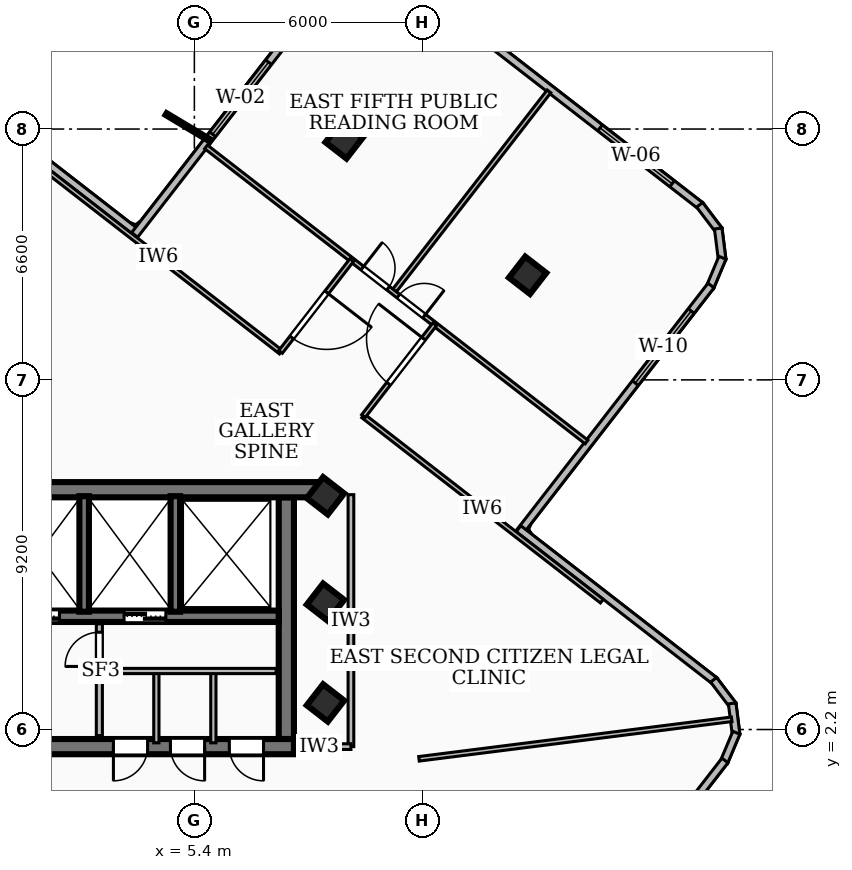
"""IFC4 building model, lengths in metres.
Left out: names, types, materials, properties, quantities, classifications, styles, units other than length and angle.
Written with IfcOpenShell. Run it as: python <this file> out.ifc"""

import sys

from ifc_helpers import new_model, si_unit, direction, frame, frame_2d, origin, origin_2d, place, context, subcontext, project, spatial, rectangle, extrude, element, fill, save


model = new_model("IFC4")
c1 = context("Model", 3, precision=1e-05, world=origin(), true_north=direction((0.0, 1.0)))
c2 = subcontext(c1, "Body", "Model", "MODEL_VIEW")
j1 = project(units=[si_unit("LENGTHUNIT", "METRE"), si_unit("PLANEANGLEUNIT", "RADIAN")], contexts=[c1])
p1 = place(None, origin())
s1 = spatial("IfcSite", under=j1, at=p1, CompositionType="ELEMENT")
p2 = place(p1, origin())
s2 = spatial("IfcBuilding", under=s1, at=p2, CompositionType="ELEMENT")
p3 = place(p2, frame((0.0, 0.0, 257.76)))
s3 = spatial("IfcBuildingStorey", under=s2, at=p3, CompositionType="ELEMENT", Elevation=257.76)
p4 = place(p3, frame((-8.78, 8.51, 0.0), z_axis=(0.0, 0.0, 1.0), x_axis=(1.0, 0.0, 0.0)))
e1 = element("IfcWall", 1, at=p4, inside=s3, PredefinedType="SHEAR", context=c2, shape_type="SweptSolid", body=[
    extrude(rectangle(XDim=17.56, YDim=0.4, at=frame_2d((8.78, 0.0))), origin(), (0.0, 0.0, 1.0), 3.16),
])
p5 = place(p3, frame((8.02, 1.75, 0.0), z_axis=(0.0, 0.0, 1.0), x_axis=(-1.0, 0.0, 0.0)))
e2 = element("IfcWall", 2, at=p5, inside=s3, PredefinedType="SHEAR", context=c2, shape_type="SweptSolid", body=[
    extrude(rectangle(XDim=16.04, YDim=0.4, at=frame_2d((8.02, 0.0))), origin(), (0.0, 0.0, 1.0), 3.16),
])
p6 = place(p5, frame((7.45, 0.0, 0.0)))
e3 = element("IfcOpeningElement", 3, at=p6, cuts=e2, PredefinedType="OPENING", context=c2, shape_type="SweptSolid", body=[
    extrude(rectangle(XDim=1.0, YDim=2.1, at=frame_2d((0.5, 1.05))), frame((0.0, 0.21, 0.0), z_axis=(0.0, -1.0, 0.0), x_axis=(1.0, 0.0, 0.0)), (0.0, 0.0, 1.0), 0.42),
])
p7 = place(p5, frame((14.285, 0.0, 0.0)))
e4 = element("IfcOpeningElement", 4, at=p7, cuts=e2, PredefinedType="OPENING", context=c2, shape_type="SweptSolid", body=[
    extrude(rectangle(XDim=1.05, YDim=2.15, at=frame_2d((0.525, 1.075))), frame((0.0, 0.21, 0.0), z_axis=(0.0, -1.0, 0.0), x_axis=(1.0, 0.0, 0.0)), (0.0, 0.0, 1.0), 0.42),
])
p8 = place(p5, frame((12.725, 0.0, 0.0)))
e5 = element("IfcOpeningElement", 5, at=p8, cuts=e2, PredefinedType="OPENING", context=c2, shape_type="SweptSolid", body=[
    extrude(rectangle(XDim=1.05, YDim=2.15, at=frame_2d((0.525, 1.075))), frame((0.0, 0.21, 0.0), z_axis=(0.0, -1.0, 0.0), x_axis=(1.0, 0.0, 0.0)), (0.0, 0.0, 1.0), 0.42),
])
p9 = place(p5, frame((11.165, 0.0, 0.0)))
e6 = element("IfcOpeningElement", 6, at=p9, cuts=e2, PredefinedType="OPENING", context=c2, shape_type="SweptSolid", body=[
    extrude(rectangle(XDim=1.05, YDim=2.15, at=frame_2d((0.525, 1.075))), frame((0.0, 0.21, 0.0), z_axis=(0.0, -1.0, 0.0), x_axis=(1.0, 0.0, 0.0)), (0.0, 0.0, 1.0), 0.42),
])
p10 = place(p5, frame((3.85, 0.0, 0.0)))
e7 = element("IfcOpeningElement", 7, at=p10, cuts=e2, PredefinedType="OPENING", context=c2, shape_type="SweptSolid", body=[
    extrude(rectangle(XDim=0.9, YDim=2.06, at=frame_2d((0.45, 1.03))), frame((0.0, 0.21, 0.0), z_axis=(0.0, -1.0, 0.0), x_axis=(1.0, 0.0, 0.0)), (0.0, 0.0, 1.0), 0.42),
])
p11 = place(p5, frame((2.35, 0.0, 0.0)))
e8 = element("IfcOpeningElement", 8, at=p11, cuts=e2, PredefinedType="OPENING", context=c2, shape_type="SweptSolid", body=[
    extrude(rectangle(XDim=0.9, YDim=2.06, at=frame_2d((0.45, 1.03))), frame((0.0, 0.21, 0.0), z_axis=(0.0, -1.0, 0.0), x_axis=(1.0, 0.0, 0.0)), (0.0, 0.0, 1.0), 0.42),
])
p12 = place(p5, frame((0.8, 0.0, 0.0)))
e9 = element("IfcOpeningElement", 9, at=p12, cuts=e2, PredefinedType="OPENING", context=c2, shape_type="SweptSolid", body=[
    extrude(rectangle(XDim=0.9, YDim=2.06, at=frame_2d((0.45, 1.03))), frame((0.0, 0.21, 0.0), z_axis=(0.0, -1.0, 0.0), x_axis=(1.0, 0.0, 0.0)), (0.0, 0.0, 1.0), 0.42),
])
p13 = place(p3, frame((7.82, 8.31, 0.0), z_axis=(0.0, 0.0, 1.0), x_axis=(0.0, -1.0, 0.0)))
e10 = element("IfcWall", 10, at=p13, inside=s3, PredefinedType="SHEAR", context=c2, shape_type="SweptSolid", body=[
    extrude(rectangle(XDim=6.36, YDim=0.4, at=frame_2d((3.18, 0.0))), origin(), (0.0, 0.0, 1.0), 3.16),
])
p14 = place(p3, frame((7.62, 5.18, 0.0), z_axis=(0.0, 0.0, 1.0), x_axis=(-1.0, 0.0, 0.0)))
e11 = element("IfcWall", 11, at=p14, inside=s3, PredefinedType="SOLIDWALL", context=c2, shape_type="SweptSolid", body=[
    extrude(rectangle(XDim=15.24, YDim=0.3, at=frame_2d((7.62, 0.0))), origin(), (0.0, 0.0, 1.0), 3.16),
])
p15 = place(p14, frame((5.77, 0.0, 0.0)))
e12 = element("IfcOpeningElement", 12, at=p15, cuts=e11, PredefinedType="OPENING", context=c2, shape_type="SweptSolid", body=[
    extrude(rectangle(XDim=1.1, YDim=2.15, at=frame_2d((0.55, 1.075))), frame((0.0, 0.16, 0.0), z_axis=(0.0, -1.0, 0.0), x_axis=(1.0, 0.0, 0.0)), (0.0, 0.0, 1.0), 0.32),
])
p16 = place(p14, frame((2.97, 0.0, 0.0)))
e13 = element("IfcOpeningElement", 13, at=p16, cuts=e11, PredefinedType="OPENING", context=c2, shape_type="SweptSolid", body=[
    extrude(rectangle(XDim=1.1, YDim=2.15, at=frame_2d((0.55, 1.075))), frame((0.0, 0.16, 0.0), z_axis=(0.0, -1.0, 0.0), x_axis=(1.0, 0.0, 0.0)), (0.0, 0.0, 1.0), 0.32),
])
p17 = place(p14, frame((7.97, 0.0, 0.0)))
e14 = element("IfcOpeningElement", 14, at=p17, cuts=e11, PredefinedType="OPENING", context=c2, shape_type="SweptSolid", body=[
    extrude(rectangle(XDim=1.0, YDim=2.1, at=frame_2d((0.5, 1.05))), frame((0.0, 0.16, 0.0), z_axis=(0.0, -1.0, 0.0), x_axis=(1.0, 0.0, 0.0)), (0.0, 0.0, 1.0), 0.32),
])
for number, where, z_axis, x_axis in (
    (15, (2.5, 5.3, 0.0), (0.0, 0.0, 1.0), (0.0, 1.0, 0.0)),
    (16, (4.9, 5.3, 0.0), (0.0, 0.0, 1.0), (0.0, 1.0, 0.0)),
):
    element("IfcWall", number, at=place(p3, frame(where, z_axis=z_axis, x_axis=x_axis)), inside=s3, PredefinedType="SOLIDWALL", context=c2, shape_type="SweptSolid", body=[
        extrude(rectangle(XDim=3.04, YDim=0.25, at=frame_2d((1.52, 0.0))), origin(), (0.0, 0.0, 1.0), 3.16),
    ])
for number, where, z_axis, x_axis in (
    (17, (8.85, 2.9, 0.0), (0.0, 0.0, 1.0), (0.613, 0.79, 0.0)),
    (18, (8.85, 5.55, 0.0), (0.0, 0.0, 1.0), (0.613, 0.79, 0.0)),
    (19, (8.85, 8.35, 0.0), (0.0, 0.0, 1.0), (0.613, 0.79, 0.0)),
    (20, (14.169, 14.152, 0.0), (0.0, 0.0, 1.0), (0.613, 0.79, 0.0)),
    (21, (9.341, 17.714, 0.0), (0.0, 0.0, 1.0), (0.613, 0.79, 0.0)),
):
    element("IfcColumn", number, at=place(p3, frame(where, z_axis=z_axis, x_axis=x_axis)), inside=s3, PredefinedType="COLUMN", context=c2, shape_type="SweptSolid", body=[
        extrude(rectangle(XDim=0.7, YDim=0.7, at=origin_2d()), origin(), (0.0, 0.0, 1.0), 3.42),
    ])
p18 = place(p3, frame((-1.386, 19.362, 0.0), z_axis=(0.0, 0.0, 1.0), x_axis=(0.790076990755, -0.613007625303, 0.0)))
e22 = element("IfcWall", 22, at=p18, inside=s3, PredefinedType="SOLIDWALL", context=c2, shape_type="SweptSolid", body=[
    extrude(rectangle(XDim=6.742, YDim=0.2, at=frame_2d((3.371, 0.0))), origin(), (0.0, 0.0, 1.0), 3.16),
])
p19 = place(p3, frame((3.829, 15.215, 0.0), z_axis=(0.0, 0.0, 1.0), x_axis=(0.612910709336, 0.790152176724, 0.0)))
e23 = element("IfcWall", 23, at=p19, inside=s3, PredefinedType="SOLIDWALL", context=c2, shape_type="SweptSolid", body=[
    extrude(rectangle(XDim=8.243, YDim=0.2, at=frame_2d((4.121, 0.0))), origin(), (0.0, 0.0, 1.0), 3.16),
])
p20 = place(p19, frame((3.35, 0.0, 0.85)))
e24 = element("IfcOpeningElement", 24, at=p20, cuts=e23, PredefinedType="OPENING", context=c2, shape_type="SweptSolid", body=[
    extrude(rectangle(XDim=2.4, YDim=2.1, at=frame_2d((1.2, 1.05))), frame((0.0, 0.11, 0.0), z_axis=(0.0, -1.0, 0.0), x_axis=(1.0, 0.0, 0.0)), (0.0, 0.0, 1.0), 0.22),
])
p21 = place(p3, frame((10.969, 21.992, 0.0), z_axis=(0.0, 0.0, 1.0), x_axis=(0.790145127041, -0.612919797537, 0.0)))
e25 = element("IfcWall", 25, at=p21, inside=s3, PredefinedType="SOLIDWALL", context=c2, shape_type="SweptSolid", body=[
    extrude(rectangle(XDim=9.823, YDim=0.2, at=frame_2d((4.912, 0.0))), origin(), (0.0, 0.0, 1.0), 3.16),
])
p22 = place(p21, frame((6.462, 0.0, 0.85)))
e26 = element("IfcOpeningElement", 26, at=p22, cuts=e25, PredefinedType="OPENING", context=c2, shape_type="SweptSolid", body=[
    extrude(rectangle(XDim=2.4, YDim=1.85, at=frame_2d((1.2, 0.925))), frame((0.0, 0.11, 0.0), z_axis=(0.0, -1.0, 0.0), x_axis=(1.0, 0.0, 0.0)), (0.0, 0.0, 1.0), 0.22),
])
p23 = place(p3, frame((18.696, 16.006, 0.0), z_axis=(0.0, 0.0, 1.0), x_axis=(0.604322767077, -0.796739601873, 0.0)))
e27 = element("IfcWall", 27, at=p23, inside=s3, PredefinedType="SOLIDWALL", context=c2, shape_type="SweptSolid", body=[
    extrude(rectangle(XDim=0.839, YDim=0.2, at=frame_2d((0.419, 0.0))), origin(), (0.0, 0.0, 1.0), 3.16),
])
p24 = place(p3, frame((19.185, 15.383, 0.0), z_axis=(0.0, 0.0, 1.0), x_axis=(0.124945697241, -0.992163581644, 0.0)))
e28 = element("IfcWall", 28, at=p24, inside=s3, PredefinedType="SOLIDWALL", context=c2, shape_type="SweptSolid", body=[
    extrude(rectangle(XDim=0.824, YDim=0.2, at=frame_2d((0.412, 0.0))), origin(), (0.0, 0.0, 1.0), 3.16),
])
p25 = place(p3, frame((19.295, 14.613, 0.0), z_axis=(0.0, 0.0, 1.0), x_axis=(-0.387549275101, -0.92184898946, 0.0)))
e29 = element("IfcWall", 29, at=p25, inside=s3, PredefinedType="SOLIDWALL", context=c2, shape_type="SweptSolid", body=[
    extrude(rectangle(XDim=0.838, YDim=0.2, at=frame_2d((0.419, 0.0))), origin(), (0.0, 0.0, 1.0), 3.16),
])
p26 = place(p3, frame((18.995, 13.883, 0.0), z_axis=(0.0, 0.0, 1.0), x_axis=(-0.612894114019, -0.790165049215, 0.0)))
e30 = element("IfcWall", 30, at=p26, inside=s3, PredefinedType="SOLIDWALL", context=c2, shape_type="SweptSolid", body=[
    extrude(rectangle(XDim=8.241, YDim=0.2, at=frame_2d((4.121, 0.0))), origin(), (0.0, 0.0, 1.0), 3.16),
])
p27 = place(p26, frame((0.85, 0.0, 0.85)))
e31 = element("IfcOpeningElement", 31, at=p27, cuts=e30, PredefinedType="OPENING", context=c2, shape_type="SweptSolid", body=[
    extrude(rectangle(XDim=2.4, YDim=1.65, at=frame_2d((1.2, 0.825))), frame((0.0, 0.11, 0.0), z_axis=(0.0, -1.0, 0.0), x_axis=(1.0, 0.0, 0.0)), (0.0, 0.0, 1.0), 0.22),
])
p28 = place(p3, frame((13.93, 7.483, 0.0), z_axis=(0.0, 0.0, 1.0), x_axis=(0.790217588081, -0.612826373036, 0.0)))
e32 = element("IfcWall", 32, at=p28, inside=s3, PredefinedType="SOLIDWALL", context=c2, shape_type="SweptSolid", body=[
    extrude(rectangle(XDim=6.542, YDim=0.2, at=frame_2d((3.271, 0.0))), origin(), (0.0, 0.0, 1.0), 3.16),
])
p29 = place(p3, frame((19.064, 3.509, 0.0), z_axis=(0.0, 0.0, 1.0), x_axis=(0.603908166539, -0.797053904317, 0.0)))
e33 = element("IfcWall", 33, at=p29, inside=s3, PredefinedType="SOLIDWALL", context=c2, shape_type="SweptSolid", body=[
    extrude(rectangle(XDim=0.838, YDim=0.2, at=frame_2d((0.419, 0.0))), origin(), (0.0, 0.0, 1.0), 3.16),
])
p30 = place(p3, frame((19.552, 2.886, 0.0), z_axis=(0.0, 0.0, 1.0), x_axis=(0.124799052175, -0.992182038023, 0.0)))
e34 = element("IfcWall", 34, at=p30, inside=s3, PredefinedType="SOLIDWALL", context=c2, shape_type="SweptSolid", body=[
    extrude(rectangle(XDim=0.825, YDim=0.2, at=frame_2d((0.413, 0.0))), origin(), (0.0, 0.0, 1.0), 3.16),
])
p31 = place(p3, frame((19.662, 2.115, 0.0), z_axis=(0.0, 0.0, 1.0), x_axis=(-0.388213349612, -0.921569528133, 0.0)))
e35 = element("IfcWall", 35, at=p31, inside=s3, PredefinedType="SOLIDWALL", context=c2, shape_type="SweptSolid", body=[
    extrude(rectangle(XDim=0.838, YDim=0.2, at=frame_2d((0.419, 0.0))), origin(), (0.0, 0.0, 1.0), 3.16),
])
p32 = place(p3, frame((19.362, 1.386, 0.0), z_axis=(0.0, 0.0, 1.0), x_axis=(-0.613007625303, -0.790076990755, 0.0)))
e36 = element("IfcWall", 36, at=p32, inside=s3, PredefinedType="SOLIDWALL", context=c2, shape_type="SweptSolid", body=[
    extrude(rectangle(XDim=6.742, YDim=0.2, at=frame_2d((3.371, 0.0))), origin(), (0.0, 0.0, 1.0), 3.16),
])
p33 = place(p3, frame((2.9, 2.04, 0.0), z_axis=(0.0, 0.0, 1.0), x_axis=(0.0, 1.0, 0.0)))
e37 = element("IfcWall", 37, at=p33, inside=s3, PredefinedType="PARTITIONING", context=c2, shape_type="SweptSolid", body=[
    extrude(rectangle(XDim=2.94, YDim=0.16, at=frame_2d((1.47, 0.0))), origin(), (0.0, 0.0, 1.0), 2.39),
])
p34 = place(p33, frame((1.82, 0.0, 0.0)))
e38 = element("IfcOpeningElement", 38, at=p34, cuts=e37, PredefinedType="OPENING", context=c2, shape_type="SweptSolid", body=[
    extrude(rectangle(XDim=0.9, YDim=2.06, at=frame_2d((0.45, 1.03))), frame((0.0, 0.09, 0.0), z_axis=(0.0, -1.0, 0.0), x_axis=(1.0, 0.0, 0.0)), (0.0, 0.0, 1.0), 0.18),
])
p35 = place(p3, frame((2.9, 3.74, 0.0), z_axis=(0.0, 0.0, 1.0), x_axis=(1.0, 0.0, 0.0)))
e39 = element("IfcWall", 39, at=p35, inside=s3, PredefinedType="PARTITIONING", context=c2, shape_type="SweptSolid", body=[
    extrude(rectangle(XDim=4.65, YDim=0.138, at=frame_2d((2.325, 0.0))), origin(), (0.0, 0.0, 1.0), 3.16),
])
for number, where, z_axis, x_axis in (
    (40, (4.4, 1.85, 0.0), (0.0, 0.0, 1.0), (0.0, 1.0, 0.0)),
    (41, (5.9, 1.85, 0.0), (0.0, 0.0, 1.0), (0.0, 1.0, 0.0)),
):
    element("IfcWall", number, at=place(p3, frame(where, z_axis=z_axis, x_axis=x_axis)), inside=s3, PredefinedType="PARTITIONING", context=c2, shape_type="SweptSolid", body=[
        extrude(rectangle(XDim=1.89, YDim=0.138, at=frame_2d((0.945, 0.0))), origin(), (0.0, 0.0, 1.0), 2.39),
    ])
p36 = place(p3, frame((9.52, 1.75, 0.0), z_axis=(0.0, 0.0, 1.0), x_axis=(0.0, 1.0, 0.0)))
e42 = element("IfcWall", 42, at=p36, inside=s3, PredefinedType="PARTITIONING", context=c2, shape_type="SweptSolid", body=[
    extrude(rectangle(XDim=6.63, YDim=0.15, at=frame_2d((3.315, 0.0))), origin(), (0.0, 0.0, 1.0), 3.16),
])
p37 = place(p3, frame((7.85, 1.75, 0.0), z_axis=(0.0, 0.0, 1.0), x_axis=(1.0, 0.0, 0.0)))
e43 = element("IfcWall", 43, at=p37, inside=s3, PredefinedType="PARTITIONING", context=c2, shape_type="SweptSolid", body=[
    extrude(rectangle(XDim=1.67, YDim=0.15, at=frame_2d((0.835, 0.0))), origin(), (0.0, 0.0, 1.0), 2.39),
])
p38 = place(p3, frame((11.31, 1.429, 0.0), z_axis=(0.0, 0.0, 1.0), x_axis=(0.992107592132, 0.125389495712, 0.0)))
e44 = element("IfcWall", 44, at=p38, inside=s3, PredefinedType="PARTITIONING", context=c2, shape_type="SweptSolid", body=[
    extrude(rectangle(XDim=8.294, YDim=0.12, at=frame_2d((4.147, 0.0))), origin(), (0.0, 0.0, 1.0), 3.16),
])
p39 = place(p3, frame((7.676, 12.131, 0.0), z_axis=(0.0, 0.0, 1.0), x_axis=(-0.790137186805, 0.61293003355, 0.0)))
e45 = element("IfcWall", 45, at=p39, inside=s3, PredefinedType="PARTITIONING", context=c2, shape_type="SweptSolid", body=[
    extrude(rectangle(XDim=8.149, YDim=0.12, at=frame_2d((4.075, 0.0))), origin(), (0.0, 0.0, 1.0), 3.16),
])
p40 = place(p3, frame((16.122, 5.578, 0.0), z_axis=(0.0, 0.0, 1.0), x_axis=(-0.7900346363, 0.613062210094, 0.0)))
e46 = element("IfcWall", 46, at=p40, inside=s3, PredefinedType="PARTITIONING", context=c2, shape_type="SweptSolid", body=[
    extrude(rectangle(XDim=7.95, YDim=0.12, at=frame_2d((3.975, 0.0))), origin(), (0.0, 0.0, 1.0), 2.53),
])
p41 = place(p3, frame((9.544, 14.555, 0.0), z_axis=(0.0, 0.0, 1.0), x_axis=(-0.612990234131, -0.79009048397, 0.0)))
e47 = element("IfcWall", 47, at=p41, inside=s3, PredefinedType="PARTITIONING", context=c2, shape_type="SweptSolid", body=[
    extrude(rectangle(XDim=3.06, YDim=0.12, at=frame_2d((1.53, 0.0))), origin(), (0.0, 0.0, 1.0), 2.53),
])
p42 = place(p41, frame((1.08, 0.0, 0.0)))
e48 = element("IfcOpeningElement", 48, at=p42, cuts=e47, PredefinedType="OPENING", context=c2, shape_type="SweptSolid", body=[
    extrude(rectangle(XDim=1.5, YDim=2.12, at=frame_2d((0.75, 1.06))), frame((0.0, 0.07, 0.0), z_axis=(0.0, -1.0, 0.0), x_axis=(1.0, 0.0, 0.0)), (0.0, 0.0, 1.0), 0.14),
])
p43 = place(p3, frame((9.849, 10.446, 0.0), z_axis=(0.0, 0.0, 1.0), x_axis=(0.612945563076, 0.790125139902, 0.0)))
e49 = element("IfcWall", 49, at=p43, inside=s3, PredefinedType="PARTITIONING", context=c2, shape_type="SweptSolid", body=[
    extrude(rectangle(XDim=3.059, YDim=0.12, at=frame_2d((1.53, 0.0))), origin(), (0.0, 0.0, 1.0), 3.16),
])
p44 = place(p43, frame((1.08, 0.0, 0.0)))
e50 = element("IfcOpeningElement", 50, at=p44, cuts=e49, PredefinedType="OPENING", context=c2, shape_type="SweptSolid", body=[
    extrude(rectangle(XDim=1.5, YDim=2.12, at=frame_2d((0.75, 1.06))), frame((0.0, 0.07, 0.0), z_axis=(0.0, -1.0, 0.0), x_axis=(1.0, 0.0, 0.0)), (0.0, 0.0, 1.0), 0.14),
])
p45 = place(p3, frame((10.671, 13.757, 0.0), z_axis=(0.0, 0.0, 1.0), x_axis=(0.61292966537, 0.790137472412, 0.0)))
e51 = element("IfcWall", 51, at=p45, inside=s3, PredefinedType="PARTITIONING", context=c2, shape_type="SweptSolid", body=[
    extrude(rectangle(XDim=6.624, YDim=0.12, at=frame_2d((3.312, 0.0))), origin(), (0.0, 0.0, 1.0), 3.16),
])
p46 = place(p3, frame((5.707, 17.531, 0.0), z_axis=(0.0, 0.0, 1.0), x_axis=(0.790153529347, -0.612908965557, 0.0)))
e52 = element("IfcWall", 52, at=p46, inside=s3, PredefinedType="PARTITIONING", context=c2, shape_type="SweptSolid", body=[
    extrude(rectangle(XDim=12.671, YDim=0.12, at=frame_2d((6.335, 0.0))), origin(), (0.0, 0.0, 1.0), 2.53),
])
p47 = place(p46, frame((6.405, 0.0, 0.0)))
e53 = element("IfcOpeningElement", 53, at=p47, cuts=e52, PredefinedType="OPENING", context=c2, shape_type="SweptSolid", body=[
    extrude(rectangle(XDim=0.86, YDim=2.04, at=frame_2d((0.43, 1.02))), frame((0.0, 0.07, 0.0), z_axis=(0.0, -1.0, 0.0), x_axis=(1.0, 0.0, 0.0)), (0.0, 0.0, 1.0), 0.14),
])
p48 = place(p46, frame((5.205, 0.0, 0.0)))
e54 = element("IfcOpeningElement", 54, at=p48, cuts=e52, PredefinedType="OPENING", context=c2, shape_type="SweptSolid", body=[
    extrude(rectangle(XDim=0.86, YDim=2.04, at=frame_2d((0.43, 1.02))), frame((0.0, 0.07, 0.0), z_axis=(0.0, -1.0, 0.0), x_axis=(1.0, 0.0, 0.0)), (0.0, 0.0, 1.0), 0.14),
])
p49 = place(p20, origin())
e55 = element("IfcWindow", 55, at=p49, inside=s3, PartitioningType="SINGLE_PANEL", PredefinedType="WINDOW", context=c2, shape_type="SweptSolid", body=[
    extrude(rectangle(XDim=2.4, YDim=2.1, at=frame_2d((1.2, 1.05))), frame((0.0, 0.03, 0.0), z_axis=(0.0, -1.0, 0.0), x_axis=(1.0, 0.0, 0.0)), (0.0, 0.0, 1.0), 0.06),
])
fill(e24, e55)
p50 = place(p22, origin())
e56 = element("IfcWindow", 56, at=p50, inside=s3, PartitioningType="SINGLE_PANEL", PredefinedType="WINDOW", context=c2, shape_type="SweptSolid", body=[
    extrude(rectangle(XDim=2.4, YDim=1.85, at=frame_2d((1.2, 0.925))), frame((0.0, 0.03, 0.0), z_axis=(0.0, -1.0, 0.0), x_axis=(1.0, 0.0, 0.0)), (0.0, 0.0, 1.0), 0.06),
])
fill(e26, e56)
p51 = place(p27, origin())
e57 = element("IfcWindow", 57, at=p51, inside=s3, PartitioningType="SINGLE_PANEL", PredefinedType="WINDOW", context=c2, shape_type="SweptSolid", body=[
    extrude(rectangle(XDim=2.4, YDim=1.65, at=frame_2d((1.2, 0.825))), frame((0.0, 0.03, 0.0), z_axis=(0.0, -1.0, 0.0), x_axis=(1.0, 0.0, 0.0)), (0.0, 0.0, 1.0), 0.06),
])
fill(e31, e57)
p52 = place(p15, origin())
e58 = element("IfcDoor", 58, at=p52, inside=s3, OperationType="DOUBLE_DOOR_SLIDING", PredefinedType="DOOR", context=c2, shape_type="SweptSolid", body=[
    extrude(rectangle(XDim=1.1, YDim=2.15, at=frame_2d((0.55, 1.075))), frame((0.0, 0.025, 0.0), z_axis=(0.0, -1.0, 0.0), x_axis=(1.0, 0.0, 0.0)), (0.0, 0.0, 1.0), 0.05),
])
fill(e12, e58)
p53 = place(p16, origin())
e59 = element("IfcDoor", 59, at=p53, inside=s3, OperationType="DOUBLE_DOOR_SLIDING", PredefinedType="DOOR", context=c2, shape_type="SweptSolid", body=[
    extrude(rectangle(XDim=1.1, YDim=2.15, at=frame_2d((0.55, 1.075))), frame((0.0, 0.025, 0.0), z_axis=(0.0, -1.0, 0.0), x_axis=(1.0, 0.0, 0.0)), (0.0, 0.0, 1.0), 0.05),
])
fill(e13, e59)
p54 = place(p10, origin())
e60 = element("IfcDoor", 60, at=p54, inside=s3, OperationType="SINGLE_SWING_RIGHT", PredefinedType="DOOR", context=c2, shape_type="SweptSolid", body=[
    extrude(rectangle(XDim=0.9, YDim=2.06, at=frame_2d((0.45, 1.03))), frame((0.0, 0.025, 0.0), z_axis=(0.0, -1.0, 0.0), x_axis=(1.0, 0.0, 0.0)), (0.0, 0.0, 1.0), 0.05),
])
fill(e7, e60)
p55 = place(p11, origin())
e61 = element("IfcDoor", 61, at=p55, inside=s3, OperationType="SINGLE_SWING_LEFT", PredefinedType="DOOR", context=c2, shape_type="SweptSolid", body=[
    extrude(rectangle(XDim=0.9, YDim=2.06, at=frame_2d((0.45, 1.03))), frame((0.0, 0.025, 0.0), z_axis=(0.0, -1.0, 0.0), x_axis=(1.0, 0.0, 0.0)), (0.0, 0.0, 1.0), 0.05),
])
fill(e8, e61)
p56 = place(p12, origin())
e62 = element("IfcDoor", 62, at=p56, inside=s3, OperationType="SINGLE_SWING_LEFT", PredefinedType="DOOR", context=c2, shape_type="SweptSolid", body=[
    extrude(rectangle(XDim=0.9, YDim=2.06, at=frame_2d((0.45, 1.03))), frame((0.0, 0.025, 0.0), z_axis=(0.0, -1.0, 0.0), x_axis=(1.0, 0.0, 0.0)), (0.0, 0.0, 1.0), 0.05),
])
fill(e9, e62)
p57 = place(p34, origin())
e63 = element("IfcDoor", 63, at=p57, inside=s3, OperationType="SINGLE_SWING_LEFT", PredefinedType="DOOR", context=c2, shape_type="SweptSolid", body=[
    extrude(rectangle(XDim=0.9, YDim=2.06, at=frame_2d((0.45, 1.03))), frame((0.0, 0.025, 0.0), z_axis=(0.0, -1.0, 0.0), x_axis=(1.0, 0.0, 0.0)), (0.0, 0.0, 1.0), 0.05),
])
fill(e38, e63)
p58 = place(p42, origin())
e64 = element("IfcDoor", 64, at=p58, inside=s3, OperationType="SINGLE_SWING_LEFT", PredefinedType="DOOR", context=c2, shape_type="SweptSolid", body=[
    extrude(rectangle(XDim=1.5, YDim=2.12, at=frame_2d((0.75, 1.06))), frame((0.0, 0.025, 0.0), z_axis=(0.0, -1.0, 0.0), x_axis=(1.0, 0.0, 0.0)), (0.0, 0.0, 1.0), 0.05),
])
fill(e48, e64)
p59 = place(p44, origin())
e65 = element("IfcDoor", 65, at=p59, inside=s3, OperationType="SINGLE_SWING_RIGHT", PredefinedType="DOOR", context=c2, shape_type="SweptSolid", body=[
    extrude(rectangle(XDim=1.5, YDim=2.12, at=frame_2d((0.75, 1.06))), frame((0.0, 0.025, 0.0), z_axis=(0.0, -1.0, 0.0), x_axis=(1.0, 0.0, 0.0)), (0.0, 0.0, 1.0), 0.05),
])
fill(e50, e65)
p60 = place(p47, origin())
e66 = element("IfcDoor", 66, at=p60, inside=s3, OperationType="SINGLE_SWING_RIGHT", PredefinedType="DOOR", context=c2, shape_type="SweptSolid", body=[
    extrude(rectangle(XDim=0.86, YDim=2.04, at=frame_2d((0.43, 1.02))), frame((0.0, 0.025, 0.0), z_axis=(0.0, -1.0, 0.0), x_axis=(1.0, 0.0, 0.0)), (0.0, 0.0, 1.0), 0.05),
])
fill(e53, e66)
p61 = place(p48, origin())
e67 = element("IfcDoor", 67, at=p61, inside=s3, OperationType="SINGLE_SWING_LEFT", PredefinedType="DOOR", context=c2, shape_type="SweptSolid", body=[
    extrude(rectangle(XDim=0.86, YDim=2.04, at=frame_2d((0.43, 1.02))), frame((0.0, 0.025, 0.0), z_axis=(0.0, -1.0, 0.0), x_axis=(1.0, 0.0, 0.0)), (0.0, 0.0, 1.0), 0.05),
])
fill(e54, e67)
save(model, sys.argv[1])
